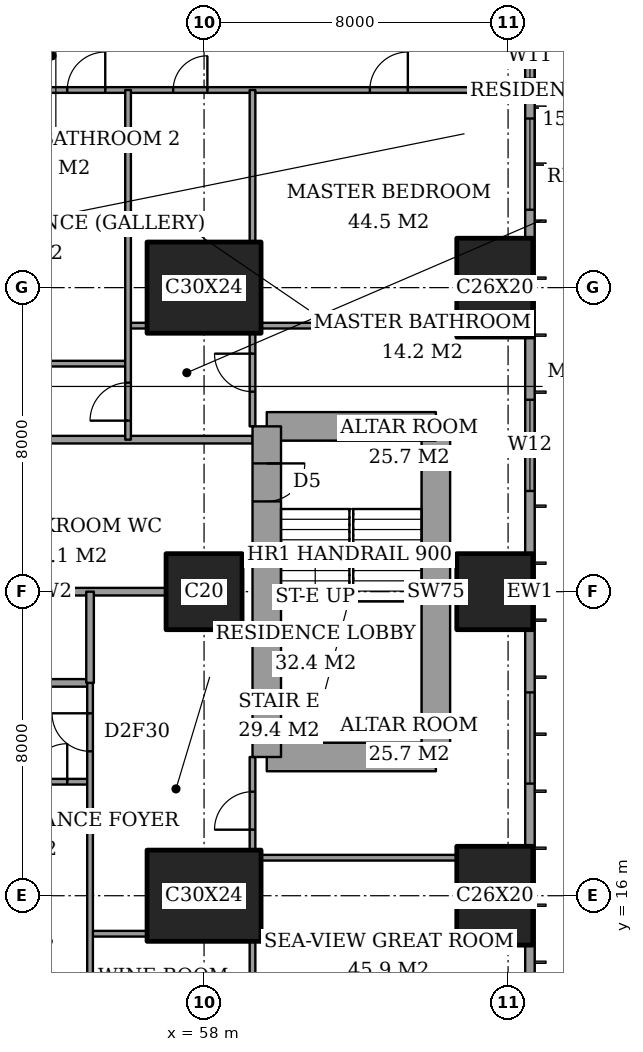
"""IFC4 building model, lengths in metres.
Left out: names, types, materials, properties, quantities, classifications, styles, units other than length and angle.
Written with IfcOpenShell. Run it as: python <this file> out.ifc"""

import sys

from ifc_helpers import new_model, si_unit, direction, frame, frame_2d, origin, origin_2d, place, context, subcontext, project, spatial, rectangle, extrude, element, fill, save


model = new_model("IFC4")
c1 = context("Model", 3, precision=1e-05, world=origin(), true_north=direction((0.0, 1.0)))
c2 = subcontext(c1, "Body", "Model", "MODEL_VIEW")
j1 = project(units=[si_unit("LENGTHUNIT", "METRE"), si_unit("PLANEANGLEUNIT", "RADIAN")], contexts=[c1])
p1 = place(None, origin())
s1 = spatial("IfcSite", under=j1, at=p1, CompositionType="ELEMENT")
p2 = place(p1, origin())
s2 = spatial("IfcBuilding", under=s1, at=p2, CompositionType="ELEMENT")
p3 = place(p2, frame((0.0, 0.0, 150.2)))
s3 = spatial("IfcBuildingStorey", under=s2, at=p3, CompositionType="ELEMENT", Elevation=150.2)
p4 = place(p3, frame((58.0, 16.0, 0.0), z_axis=(0.0, 0.0, 1.0), x_axis=(1.0, 0.0, 0.0)))
e1 = element("IfcColumn", 1, at=p4, inside=s3, PredefinedType="COLUMN", context=c2, shape_type="SweptSolid", body=[
    extrude(rectangle(XDim=3.0, YDim=2.4, at=origin_2d()), origin(), (0.0, 0.0, 1.0), 3.6),
])
p5 = place(p3, frame((58.0, 24.0, 0.0), z_axis=(0.0, 0.0, 1.0), x_axis=(1.0, 0.0, 0.0)))
e2 = element("IfcColumn", 2, at=p5, inside=s3, PredefinedType="COLUMN", context=c2, shape_type="SweptSolid", body=[
    extrude(rectangle(XDim=2.0, YDim=2.0, at=origin_2d()), origin(), (0.0, 0.0, 1.0), 3.6),
])
p6 = place(p3, frame((58.0, 32.0, 0.0), z_axis=(0.0, 0.0, 1.0), x_axis=(1.0, 0.0, 0.0)))
e3 = element("IfcColumn", 3, at=p6, inside=s3, PredefinedType="COLUMN", context=c2, shape_type="SweptSolid", body=[
    extrude(rectangle(XDim=3.0, YDim=2.4, at=origin_2d()), origin(), (0.0, 0.0, 1.0), 3.6),
])
p7 = place(p3, frame((65.65, 16.0, 0.0), z_axis=(0.0, 0.0, 1.0), x_axis=(0.0, 1.0, 0.0)))
e4 = element("IfcColumn", 4, at=p7, inside=s3, PredefinedType="COLUMN", context=c2, shape_type="SweptSolid", body=[
    extrude(rectangle(XDim=2.6, YDim=2.0, at=origin_2d()), origin(), (0.0, 0.0, 1.0), 3.6),
])
p8 = place(p3, frame((65.65, 24.0, 0.0), z_axis=(0.0, 0.0, 1.0), x_axis=(1.0, 0.0, 0.0)))
e5 = element("IfcColumn", 5, at=p8, inside=s3, PredefinedType="COLUMN", context=c2, shape_type="SweptSolid", body=[
    extrude(rectangle(XDim=2.0, YDim=2.0, at=origin_2d()), origin(), (0.0, 0.0, 1.0), 3.6),
])
p9 = place(p3, frame((65.65, 32.0, 0.0), z_axis=(0.0, 0.0, 1.0), x_axis=(0.0, 1.0, 0.0)))
e6 = element("IfcColumn", 6, at=p9, inside=s3, PredefinedType="COLUMN", context=c2, shape_type="SweptSolid", body=[
    extrude(rectangle(XDim=2.6, YDim=2.0, at=origin_2d()), origin(), (0.0, 0.0, 1.0), 3.6),
])
p10 = place(p3, frame((59.65, 19.65, 0.0), z_axis=(0.0, 0.0, 1.0), x_axis=(1.0, 0.0, 0.0)))
e7 = element("IfcWall", 7, at=p10, inside=s3, PredefinedType="SHEAR", context=c2, shape_type="SweptSolid", body=[
    extrude(rectangle(XDim=4.45, YDim=0.75, at=frame_2d((2.225, 0.0))), origin(), (0.0, 0.0, 1.0), 3.6),
])
p11 = place(p3, frame((64.1, 19.65, 0.0), z_axis=(0.0, 0.0, 1.0), x_axis=(0.0, 1.0, 0.0)))
e8 = element("IfcWall", 8, at=p11, inside=s3, PredefinedType="SHEAR", context=c2, shape_type="SweptSolid", body=[
    extrude(rectangle(XDim=8.7, YDim=0.75, at=frame_2d((4.35, 0.0))), origin(), (0.0, 0.0, 1.0), 3.6),
])
p12 = place(p3, frame((64.1, 28.35, 0.0), z_axis=(0.0, 0.0, 1.0), x_axis=(-1.0, 0.0, 0.0)))
e9 = element("IfcWall", 9, at=p12, inside=s3, PredefinedType="SHEAR", context=c2, shape_type="SweptSolid", body=[
    extrude(rectangle(XDim=4.45, YDim=0.75, at=frame_2d((2.225, 0.0))), origin(), (0.0, 0.0, 1.0), 3.6),
])
p13 = place(p3, frame((59.65, 28.35, 0.0), z_axis=(0.0, 0.0, 1.0), x_axis=(0.0, -1.0, 0.0)))
e10 = element("IfcWall", 10, at=p13, inside=s3, PredefinedType="SHEAR", context=c2, shape_type="SweptSolid", body=[
    extrude(rectangle(XDim=8.7, YDim=0.75, at=frame_2d((4.35, 0.0))), origin(), (0.0, 0.0, 1.0), 3.6),
])
p14 = place(p13, frame((0.975, 0.0, 0.0)))
e11 = element("IfcOpeningElement", 11, at=p14, cuts=e10, PredefinedType="OPENING", context=c2, shape_type="SweptSolid", body=[
    extrude(rectangle(XDim=1.0, YDim=2.1, at=frame_2d((0.5, 1.05))), frame((0.0, 0.385, 0.0), z_axis=(0.0, -1.0, 0.0), x_axis=(1.0, 0.0, 0.0)), (0.0, 0.0, 1.0), 0.77),
])
p15 = place(p3, frame((66.575, 3.175, 0.0), z_axis=(0.0, 0.0, 1.0), x_axis=(0.0, 1.0, 0.0)))
e12 = element("IfcWall", 12, at=p15, inside=s3, PredefinedType="SOLIDWALL", context=c2, shape_type="SweptSolid", body=[
    extrude(rectangle(XDim=41.65, YDim=0.25, at=frame_2d((20.825, 0.0))), origin(), (0.0, 0.0, 1.0), 3.6),
])
p16 = place(p15, frame((0.775, 0.0, 0.4)))
e13 = element("IfcOpeningElement", 13, at=p16, cuts=e12, PredefinedType="OPENING", context=c2, shape_type="SweptSolid", body=[
    extrude(rectangle(XDim=2.4, YDim=2.2, at=frame_2d((1.2, 1.1))), frame((0.0, 0.135, 0.0), z_axis=(0.0, -1.0, 0.0), x_axis=(1.0, 0.0, 0.0)), (0.0, 0.0, 1.0), 0.27),
])
p17 = place(p15, frame((6.1, 0.0, 0.4)))
e14 = element("IfcOpeningElement", 14, at=p17, cuts=e12, PredefinedType="OPENING", context=c2, shape_type="SweptSolid", body=[
    extrude(rectangle(XDim=1.2, YDim=2.2, at=frame_2d((0.6, 1.1))), frame((0.0, 0.135, 0.0), z_axis=(0.0, -1.0, 0.0), x_axis=(1.0, 0.0, 0.0)), (0.0, 0.0, 1.0), 0.27),
])
p18 = place(p15, frame((8.275, 0.0, 0.4)))
e15 = element("IfcOpeningElement", 15, at=p18, cuts=e12, PredefinedType="OPENING", context=c2, shape_type="SweptSolid", body=[
    extrude(rectangle(XDim=2.4, YDim=2.2, at=frame_2d((1.2, 1.1))), frame((0.0, 0.135, 0.0), z_axis=(0.0, -1.0, 0.0), x_axis=(1.0, 0.0, 0.0)), (0.0, 0.0, 1.0), 0.27),
])
p19 = place(p15, frame((15.775, 0.0, 0.4)))
e16 = element("IfcOpeningElement", 16, at=p19, cuts=e12, PredefinedType="OPENING", context=c2, shape_type="SweptSolid", body=[
    extrude(rectangle(XDim=2.4, YDim=2.2, at=frame_2d((1.2, 1.1))), frame((0.0, 0.135, 0.0), z_axis=(0.0, -1.0, 0.0), x_axis=(1.0, 0.0, 0.0)), (0.0, 0.0, 1.0), 0.27),
])
p20 = place(p15, frame((23.475, 0.0, 0.4)))
e17 = element("IfcOpeningElement", 17, at=p20, cuts=e12, PredefinedType="OPENING", context=c2, shape_type="SweptSolid", body=[
    extrude(rectangle(XDim=2.4, YDim=2.2, at=frame_2d((1.2, 1.1))), frame((0.0, 0.135, 0.0), z_axis=(0.0, -1.0, 0.0), x_axis=(1.0, 0.0, 0.0)), (0.0, 0.0, 1.0), 0.27),
])
p21 = place(p15, frame((30.875, 0.0, 0.4)))
e18 = element("IfcOpeningElement", 18, at=p21, cuts=e12, PredefinedType="OPENING", context=c2, shape_type="SweptSolid", body=[
    extrude(rectangle(XDim=2.4, YDim=2.2, at=frame_2d((1.2, 1.1))), frame((0.0, 0.135, 0.0), z_axis=(0.0, -1.0, 0.0), x_axis=(1.0, 0.0, 0.0)), (0.0, 0.0, 1.0), 0.27),
])
p22 = place(p15, frame((34.325, 0.0, 0.4)))
e19 = element("IfcOpeningElement", 19, at=p22, cuts=e12, PredefinedType="OPENING", context=c2, shape_type="SweptSolid", body=[
    extrude(rectangle(XDim=1.2, YDim=2.2, at=frame_2d((0.6, 1.1))), frame((0.0, 0.135, 0.0), z_axis=(0.0, -1.0, 0.0), x_axis=(1.0, 0.0, 0.0)), (0.0, 0.0, 1.0), 0.27),
])
p23 = place(p15, frame((38.475, 0.0, 0.4)))
e20 = element("IfcOpeningElement", 20, at=p23, cuts=e12, PredefinedType="OPENING", context=c2, shape_type="SweptSolid", body=[
    extrude(rectangle(XDim=2.4, YDim=2.2, at=frame_2d((1.2, 1.1))), frame((0.0, 0.135, 0.0), z_axis=(0.0, -1.0, 0.0), x_axis=(1.0, 0.0, 0.0)), (0.0, 0.0, 1.0), 0.27),
])
p24 = place(p3, frame((55.0, 15.0, 0.0), z_axis=(0.0, 0.0, 1.0), x_axis=(1.0, 0.0, 0.0)))
e21 = element("IfcWall", 21, at=p24, inside=s3, PredefinedType="PARTITIONING", context=c2, shape_type="SweptSolid", body=[
    extrude(rectangle(XDim=1.5, YDim=0.15, at=frame_2d((0.75, 0.0))), origin(), (0.0, 0.0, 1.0), 3.35),
])
p25 = place(p3, frame((59.5, 17.0, 0.0), z_axis=(0.0, 0.0, 1.0), x_axis=(1.0, 0.0, 0.0)))
e22 = element("IfcWall", 22, at=p25, inside=s3, PredefinedType="PARTITIONING", context=c2, shape_type="SweptSolid", body=[
    extrude(rectangle(XDim=5.15, YDim=0.15, at=frame_2d((2.575, 0.0))), origin(), (0.0, 0.0, 1.0), 3.35),
])
p26 = place(p3, frame((51.6, 19.0, 0.0), z_axis=(0.0, 0.0, 1.0), x_axis=(1.0, 0.0, 0.0)))
e23 = element("IfcWall", 23, at=p26, inside=s3, PredefinedType="PARTITIONING", context=c2, shape_type="SweptSolid", body=[
    extrude(rectangle(XDim=3.4, YDim=0.15, at=frame_2d((1.7, 0.0))), origin(), (0.0, 0.0, 1.0), 3.35),
])
p27 = place(p26, frame((1.8, 0.0, 0.0)))
e24 = element("IfcOpeningElement", 24, at=p27, cuts=e23, PredefinedType="OPENING", context=c2, shape_type="SweptSolid", body=[
    extrude(rectangle(XDim=1.0, YDim=2.1, at=frame_2d((0.5, 1.05))), frame((0.0, 0.085, 0.0), z_axis=(0.0, -1.0, 0.0), x_axis=(1.0, 0.0, 0.0)), (0.0, 0.0, 1.0), 0.17),
])
p28 = place(p3, frame((51.2, 21.6, 0.0), z_axis=(0.0, 0.0, 1.0), x_axis=(1.0, 0.0, 0.0)))
e25 = element("IfcWall", 25, at=p28, inside=s3, PredefinedType="PARTITIONING", context=c2, shape_type="SweptSolid", body=[
    extrude(rectangle(XDim=3.8, YDim=0.2, at=frame_2d((1.9, 0.0))), origin(), (0.0, 0.0, 1.0), 3.35),
])
p29 = place(p28, frame((1.45, 0.0, 0.0)))
e26 = element("IfcOpeningElement", 26, at=p29, cuts=e25, PredefinedType="OPENING", context=c2, shape_type="SweptSolid", body=[
    extrude(rectangle(XDim=0.9, YDim=2.1, at=frame_2d((0.45, 1.05))), frame((0.0, 0.11, 0.0), z_axis=(0.0, -1.0, 0.0), x_axis=(1.0, 0.0, 0.0)), (0.0, 0.0, 1.0), 0.22),
])
p30 = place(p3, frame((51.0, 24.0, 0.0), z_axis=(0.0, 0.0, 1.0), x_axis=(1.0, 0.0, 0.0)))
e27 = element("IfcWall", 27, at=p30, inside=s3, PredefinedType="PARTITIONING", context=c2, shape_type="SweptSolid", body=[
    extrude(rectangle(XDim=6.0, YDim=0.2, at=frame_2d((3.0, 0.0))), origin(), (0.0, 0.0, 1.0), 3.35),
])
p31 = place(p3, frame((42.0, 28.0, 0.0), z_axis=(0.0, 0.0, 1.0), x_axis=(1.0, 0.0, 0.0)))
e28 = element("IfcWall", 28, at=p31, inside=s3, PredefinedType="PARTITIONING", context=c2, shape_type="SweptSolid", body=[
    extrude(rectangle(XDim=17.275, YDim=0.2, at=frame_2d((8.637, 0.0))), origin(), (0.0, 0.0, 1.0), 3.35),
])
p32 = place(p31, frame((9.4, 0.0, 0.0)))
e29 = element("IfcOpeningElement", 29, at=p32, cuts=e28, PredefinedType="OPENING", context=c2, shape_type="SweptSolid", body=[
    extrude(rectangle(XDim=1.2, YDim=2.4, at=frame_2d((0.6, 1.2))), frame((0.0, 0.11, 0.0), z_axis=(0.0, -1.0, 0.0), x_axis=(1.0, 0.0, 0.0)), (0.0, 0.0, 1.0), 0.22),
])
p33 = place(p3, frame((51.6, 30.0, 0.0), z_axis=(0.0, 0.0, 1.0), x_axis=(1.0, 0.0, 0.0)))
e30 = element("IfcWall", 30, at=p33, inside=s3, PredefinedType="PARTITIONING", context=c2, shape_type="SweptSolid", body=[
    extrude(rectangle(XDim=4.4, YDim=0.15, at=frame_2d((2.2, 0.0))), origin(), (0.0, 0.0, 1.0), 3.35),
])
p34 = place(p33, frame((0.6, 0.0, 0.0)))
e31 = element("IfcOpeningElement", 31, at=p34, cuts=e30, PredefinedType="OPENING", context=c2, shape_type="SweptSolid", body=[
    extrude(rectangle(XDim=1.0, YDim=2.1, at=frame_2d((0.5, 1.05))), frame((0.0, 0.085, 0.0), z_axis=(0.0, -1.0, 0.0), x_axis=(1.0, 0.0, 0.0)), (0.0, 0.0, 1.0), 0.17),
])
p35 = place(p3, frame((56.0, 31.0, 0.0), z_axis=(0.0, 0.0, 1.0), x_axis=(1.0, 0.0, 0.0)))
e32 = element("IfcWall", 32, at=p35, inside=s3, PredefinedType="PARTITIONING", context=c2, shape_type="SweptSolid", body=[
    extrude(rectangle(XDim=0.5, YDim=0.15, at=frame_2d((0.25, 0.0))), origin(), (0.0, 0.0, 1.0), 3.35),
])
p36 = place(p3, frame((59.5, 31.0, 0.0), z_axis=(0.0, 0.0, 1.0), x_axis=(1.0, 0.0, 0.0)))
e33 = element("IfcWall", 33, at=p36, inside=s3, PredefinedType="PARTITIONING", context=c2, shape_type="SweptSolid", body=[
    extrude(rectangle(XDim=5.15, YDim=0.15, at=frame_2d((2.575, 0.0))), origin(), (0.0, 0.0, 1.0), 3.35),
])
p37 = place(p3, frame((41.439, 37.2, 0.0), z_axis=(0.0, 0.0, 1.0), x_axis=(1.0, 0.0, 0.0)))
e34 = element("IfcWall", 34, at=p37, inside=s3, PredefinedType="PARTITIONING", context=c2, shape_type="SweptSolid", body=[
    extrude(rectangle(XDim=25.011, YDim=0.15, at=frame_2d((12.505, 0.0))), origin(), (0.0, 0.0, 1.0), 3.35),
])
p38 = place(p37, frame((10.761, 0.0, 0.0)))
e35 = element("IfcOpeningElement", 35, at=p38, cuts=e34, PredefinedType="OPENING", context=c2, shape_type="SweptSolid", body=[
    extrude(rectangle(XDim=1.0, YDim=2.1, at=frame_2d((0.5, 1.05))), frame((0.0, 0.085, 0.0), z_axis=(0.0, -1.0, 0.0), x_axis=(1.0, 0.0, 0.0)), (0.0, 0.0, 1.0), 0.17),
])
p39 = place(p37, frame((20.924, 0.0, 0.0)))
e36 = element("IfcOpeningElement", 36, at=p39, cuts=e34, PredefinedType="OPENING", context=c2, shape_type="SweptSolid", body=[
    extrude(rectangle(XDim=1.0, YDim=2.1, at=frame_2d((0.5, 1.05))), frame((0.0, 0.085, 0.0), z_axis=(0.0, -1.0, 0.0), x_axis=(1.0, 0.0, 0.0)), (0.0, 0.0, 1.0), 0.17),
])
p40 = place(p37, frame((15.749, 0.0, 0.0)))
e37 = element("IfcOpeningElement", 37, at=p40, cuts=e34, PredefinedType="OPENING", context=c2, shape_type="SweptSolid", body=[
    extrude(rectangle(XDim=0.9, YDim=2.1, at=frame_2d((0.45, 1.05))), frame((0.0, 0.085, 0.0), z_axis=(0.0, -1.0, 0.0), x_axis=(1.0, 0.0, 0.0)), (0.0, 0.0, 1.0), 0.17),
])
p41 = place(p37, frame((12.961, 0.0, 0.0)))
e38 = element("IfcOpeningElement", 38, at=p41, cuts=e34, PredefinedType="OPENING", context=c2, shape_type="SweptSolid", body=[
    extrude(rectangle(XDim=1.0, YDim=2.1, at=frame_2d((0.5, 1.05))), frame((0.0, 0.085, 0.0), z_axis=(0.0, -1.0, 0.0), x_axis=(1.0, 0.0, 0.0)), (0.0, 0.0, 1.0), 0.17),
])
p42 = place(p37, frame((7.911, 0.0, 0.0)))
e39 = element("IfcOpeningElement", 39, at=p42, cuts=e34, PredefinedType="OPENING", context=c2, shape_type="SweptSolid", body=[
    extrude(rectangle(XDim=0.9, YDim=2.1, at=frame_2d((0.45, 1.05))), frame((0.0, 0.085, 0.0), z_axis=(0.0, -1.0, 0.0), x_axis=(1.0, 0.0, 0.0)), (0.0, 0.0, 1.0), 0.17),
])
p43 = place(p37, frame((2.836, 0.0, 0.0)))
e40 = element("IfcOpeningElement", 40, at=p43, cuts=e34, PredefinedType="OPENING", context=c2, shape_type="SweptSolid", body=[
    extrude(rectangle(XDim=1.0, YDim=2.1, at=frame_2d((0.5, 1.05))), frame((0.0, 0.085, 0.0), z_axis=(0.0, -1.0, 0.0), x_axis=(1.0, 0.0, 0.0)), (0.0, 0.0, 1.0), 0.17),
])
p44 = place(p3, frame((55.0, 21.6, 0.0), z_axis=(0.0, 0.0, 1.0), x_axis=(0.0, 1.0, 0.0)))
e41 = element("IfcWall", 41, at=p44, inside=s3, PredefinedType="PARTITIONING", context=c2, shape_type="SweptSolid", body=[
    extrude(rectangle(XDim=2.4, YDim=0.2, at=frame_2d((1.2, 0.0))), origin(), (0.0, 0.0, 1.0), 3.35),
])
p45 = place(p3, frame((55.0, 10.6, 0.0), z_axis=(0.0, 0.0, 1.0), x_axis=(0.0, 1.0, 0.0)))
e42 = element("IfcWall", 42, at=p45, inside=s3, PredefinedType="PARTITIONING", context=c2, shape_type="SweptSolid", body=[
    extrude(rectangle(XDim=11.0, YDim=0.15, at=frame_2d((5.5, 0.0))), origin(), (0.0, 0.0, 1.0), 3.35),
])
p46 = place(p45, frame((9.2, 0.0, 0.0)))
e43 = element("IfcOpeningElement", 43, at=p46, cuts=e42, PredefinedType="OPENING", context=c2, shape_type="SweptSolid", body=[
    extrude(rectangle(XDim=1.0, YDim=2.1, at=frame_2d((0.5, 1.05))), frame((0.0, 0.085, 0.0), z_axis=(0.0, -1.0, 0.0), x_axis=(1.0, 0.0, 0.0)), (0.0, 0.0, 1.0), 0.17),
])
p47 = place(p3, frame((56.0, 28.0, 0.0), z_axis=(0.0, 0.0, 1.0), x_axis=(0.0, 1.0, 0.0)))
e44 = element("IfcWall", 44, at=p47, inside=s3, PredefinedType="PARTITIONING", context=c2, shape_type="SweptSolid", body=[
    extrude(rectangle(XDim=9.2, YDim=0.15, at=frame_2d((4.6, 0.0))), origin(), (0.0, 0.0, 1.0), 3.35),
])
p48 = place(p47, frame((0.5, 0.0, 0.0)))
e45 = element("IfcOpeningElement", 45, at=p48, cuts=e44, PredefinedType="OPENING", context=c2, shape_type="SweptSolid", body=[
    extrude(rectangle(XDim=1.0, YDim=2.1, at=frame_2d((0.5, 1.05))), frame((0.0, 0.085, 0.0), z_axis=(0.0, -1.0, 0.0), x_axis=(1.0, 0.0, 0.0)), (0.0, 0.0, 1.0), 0.17),
])
p49 = place(p3, frame((59.275, 10.6, 0.0), z_axis=(0.0, 0.0, 1.0), x_axis=(0.0, 1.0, 0.0)))
e46 = element("IfcWall", 46, at=p49, inside=s3, PredefinedType="PARTITIONING", context=c2, shape_type="SweptSolid", body=[
    extrude(rectangle(XDim=4.2, YDim=0.15, at=frame_2d((2.1, 0.0))), origin(), (0.0, 0.0, 1.0), 3.35),
])
p50 = place(p3, frame((59.275, 17.2, 0.0), z_axis=(0.0, 0.0, 1.0), x_axis=(0.0, 1.0, 0.0)))
e47 = element("IfcWall", 47, at=p50, inside=s3, PredefinedType="PARTITIONING", context=c2, shape_type="SweptSolid", body=[
    extrude(rectangle(XDim=2.45, YDim=0.15, at=frame_2d((1.225, 0.0))), origin(), (0.0, 0.0, 1.0), 3.35),
])
p51 = place(p50, frame((0.538, 0.0, 0.0)))
e48 = element("IfcOpeningElement", 48, at=p51, cuts=e47, PredefinedType="OPENING", context=c2, shape_type="SweptSolid", body=[
    extrude(rectangle(XDim=1.0, YDim=2.1, at=frame_2d((0.5, 1.05))), frame((0.0, 0.085, 0.0), z_axis=(0.0, -1.0, 0.0), x_axis=(1.0, 0.0, 0.0)), (0.0, 0.0, 1.0), 0.17),
])
p52 = place(p3, frame((59.275, 28.35, 0.0), z_axis=(0.0, 0.0, 1.0), x_axis=(0.0, 1.0, 0.0)))
e49 = element("IfcWall", 49, at=p52, inside=s3, PredefinedType="PARTITIONING", context=c2, shape_type="SweptSolid", body=[
    extrude(rectangle(XDim=2.45, YDim=0.15, at=frame_2d((1.225, 0.0))), origin(), (0.0, 0.0, 1.0), 3.35),
])
p53 = place(p52, frame((0.913, 0.0, 0.0)))
e50 = element("IfcOpeningElement", 50, at=p53, cuts=e49, PredefinedType="OPENING", context=c2, shape_type="SweptSolid", body=[
    extrude(rectangle(XDim=1.0, YDim=2.1, at=frame_2d((0.5, 1.05))), frame((0.0, 0.085, 0.0), z_axis=(0.0, -1.0, 0.0), x_axis=(1.0, 0.0, 0.0)), (0.0, 0.0, 1.0), 0.17),
])
p54 = place(p3, frame((59.275, 33.2, 0.0), z_axis=(0.0, 0.0, 1.0), x_axis=(0.0, 1.0, 0.0)))
e51 = element("IfcWall", 51, at=p54, inside=s3, PredefinedType="PARTITIONING", context=c2, shape_type="SweptSolid", body=[
    extrude(rectangle(XDim=4.0, YDim=0.15, at=frame_2d((2.0, 0.0))), origin(), (0.0, 0.0, 1.0), 3.35),
])
p55 = place(p19, origin())
e52 = element("IfcWindow", 52, at=p55, inside=s3, PartitioningType="SINGLE_PANEL", PredefinedType="WINDOW", context=c2, shape_type="SweptSolid", body=[
    extrude(rectangle(XDim=2.4, YDim=2.2, at=frame_2d((1.2, 1.1))), frame((0.0, 0.03, 0.0), z_axis=(0.0, -1.0, 0.0), x_axis=(1.0, 0.0, 0.0)), (0.0, 0.0, 1.0), 0.06),
])
fill(e16, e52)
p56 = place(p20, origin())
e53 = element("IfcWindow", 53, at=p56, inside=s3, PartitioningType="SINGLE_PANEL", PredefinedType="WINDOW", context=c2, shape_type="SweptSolid", body=[
    extrude(rectangle(XDim=2.4, YDim=2.2, at=frame_2d((1.2, 1.1))), frame((0.0, 0.03, 0.0), z_axis=(0.0, -1.0, 0.0), x_axis=(1.0, 0.0, 0.0)), (0.0, 0.0, 1.0), 0.06),
])
fill(e17, e53)
p57 = place(p21, origin())
e54 = element("IfcWindow", 54, at=p57, inside=s3, PartitioningType="SINGLE_PANEL", PredefinedType="WINDOW", context=c2, shape_type="SweptSolid", body=[
    extrude(rectangle(XDim=2.4, YDim=2.2, at=frame_2d((1.2, 1.1))), frame((0.0, 0.03, 0.0), z_axis=(0.0, -1.0, 0.0), x_axis=(1.0, 0.0, 0.0)), (0.0, 0.0, 1.0), 0.06),
])
fill(e18, e54)
p58 = place(p22, origin())
e55 = element("IfcWindow", 55, at=p58, inside=s3, PartitioningType="SINGLE_PANEL", PredefinedType="WINDOW", context=c2, shape_type="SweptSolid", body=[
    extrude(rectangle(XDim=1.2, YDim=2.2, at=frame_2d((0.6, 1.1))), frame((0.0, 0.03, 0.0), z_axis=(0.0, -1.0, 0.0), x_axis=(1.0, 0.0, 0.0)), (0.0, 0.0, 1.0), 0.06),
])
fill(e19, e55)
p59 = place(p51, origin())
e56 = element("IfcDoor", 56, at=p59, inside=s3, OperationType="SINGLE_SWING_RIGHT", PredefinedType="DOOR", context=c2, shape_type="SweptSolid", body=[
    extrude(rectangle(XDim=1.0, YDim=2.1, at=frame_2d((0.5, 1.05))), frame((0.0, 0.025, 0.0), z_axis=(0.0, -1.0, 0.0), x_axis=(1.0, 0.0, 0.0)), (0.0, 0.0, 1.0), 0.05),
])
fill(e48, e56)
p60 = place(p46, origin())
e57 = element("IfcDoor", 57, at=p60, inside=s3, OperationType="SINGLE_SWING_LEFT", PredefinedType="DOOR", context=c2, shape_type="SweptSolid", body=[
    extrude(rectangle(XDim=1.0, YDim=2.1, at=frame_2d((0.5, 1.05))), frame((0.0, 0.025, 0.0), z_axis=(0.0, -1.0, 0.0), x_axis=(1.0, 0.0, 0.0)), (0.0, 0.0, 1.0), 0.05),
])
fill(e43, e57)
p61 = place(p27, origin())
e58 = element("IfcDoor", 58, at=p61, inside=s3, OperationType="SINGLE_SWING_LEFT", PredefinedType="DOOR", context=c2, shape_type="SweptSolid", body=[
    extrude(rectangle(XDim=1.0, YDim=2.1, at=frame_2d((0.5, 1.05))), frame((0.0, 0.025, 0.0), z_axis=(0.0, -1.0, 0.0), x_axis=(1.0, 0.0, 0.0)), (0.0, 0.0, 1.0), 0.05),
])
fill(e24, e58)
p62 = place(p39, origin())
e59 = element("IfcDoor", 59, at=p62, inside=s3, OperationType="SINGLE_SWING_LEFT", PredefinedType="DOOR", context=c2, shape_type="SweptSolid", body=[
    extrude(rectangle(XDim=1.0, YDim=2.1, at=frame_2d((0.5, 1.05))), frame((0.0, 0.025, 0.0), z_axis=(0.0, -1.0, 0.0), x_axis=(1.0, 0.0, 0.0)), (0.0, 0.0, 1.0), 0.05),
])
fill(e36, e59)
p63 = place(p53, origin())
e60 = element("IfcDoor", 60, at=p63, inside=s3, OperationType="SINGLE_SWING_LEFT", PredefinedType="DOOR", context=c2, shape_type="SweptSolid", body=[
    extrude(rectangle(XDim=1.0, YDim=2.1, at=frame_2d((0.5, 1.05))), frame((0.0, 0.025, 0.0), z_axis=(0.0, -1.0, 0.0), x_axis=(1.0, 0.0, 0.0)), (0.0, 0.0, 1.0), 0.05),
])
fill(e50, e60)
p64 = place(p40, origin())
e61 = element("IfcDoor", 61, at=p64, inside=s3, OperationType="SINGLE_SWING_LEFT", PredefinedType="DOOR", context=c2, shape_type="SweptSolid", body=[
    extrude(rectangle(XDim=0.9, YDim=2.1, at=frame_2d((0.45, 1.05))), frame((0.0, 0.025, 0.0), z_axis=(0.0, -1.0, 0.0), x_axis=(1.0, 0.0, 0.0)), (0.0, 0.0, 1.0), 0.05),
])
fill(e37, e61)
p65 = place(p48, origin())
e62 = element("IfcDoor", 62, at=p65, inside=s3, OperationType="SINGLE_SWING_RIGHT", PredefinedType="DOOR", context=c2, shape_type="SweptSolid", body=[
    extrude(rectangle(XDim=1.0, YDim=2.1, at=frame_2d((0.5, 1.05))), frame((0.0, 0.025, 0.0), z_axis=(0.0, -1.0, 0.0), x_axis=(1.0, 0.0, 0.0)), (0.0, 0.0, 1.0), 0.05),
])
fill(e45, e62)
p66 = place(p41, origin())
e63 = element("IfcDoor", 63, at=p66, inside=s3, OperationType="SINGLE_SWING_LEFT", PredefinedType="DOOR", context=c2, shape_type="SweptSolid", body=[
    extrude(rectangle(XDim=1.0, YDim=2.1, at=frame_2d((0.5, 1.05))), frame((0.0, 0.025, 0.0), z_axis=(0.0, -1.0, 0.0), x_axis=(1.0, 0.0, 0.0)), (0.0, 0.0, 1.0), 0.05),
])
fill(e38, e63)
p67 = place(p14, origin())
e64 = element("IfcDoor", 64, at=p67, inside=s3, OperationType="SINGLE_SWING_RIGHT", PredefinedType="DOOR", context=c2, shape_type="SweptSolid", body=[
    extrude(rectangle(XDim=1.0, YDim=2.1, at=frame_2d((0.5, 1.05))), frame((0.0, 0.025, 0.0), z_axis=(0.0, -1.0, 0.0), x_axis=(1.0, 0.0, 0.0)), (0.0, 0.0, 1.0), 0.05),
])
fill(e11, e64)
save(model, sys.argv[1])
